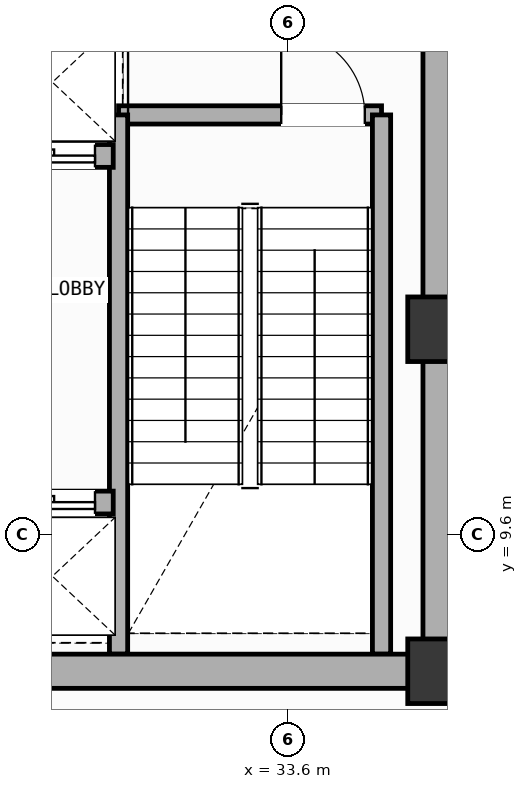
"""IFC4 building model, lengths in metres.
Left out: names, types, materials, properties, quantities, classifications, styles, units other than length and angle.
Written with IfcOpenShell. Run it as: python <this file> out.ifc"""

import sys

from ifc_helpers import new_model, si_unit, direction, frame, frame_2d, origin, origin_2d, place, context, subcontext, project, spatial, rectangle, extrude, element, fill, save


model = new_model("IFC4")
c1 = context("Model", 3, precision=1e-05, world=origin(), true_north=direction((0.0, 1.0)))
c2 = subcontext(c1, "Body", "Model", "MODEL_VIEW")
j1 = project(units=[si_unit("LENGTHUNIT", "METRE"), si_unit("PLANEANGLEUNIT", "RADIAN")], contexts=[c1])
p1 = place(None, origin())
s1 = spatial("IfcSite", under=j1, at=p1, CompositionType="ELEMENT")
p2 = place(p1, origin())
s2 = spatial("IfcBuilding", under=s1, at=p2, CompositionType="ELEMENT")
p3 = place(p2, frame((0.0, 0.0, 328.6)))
s3 = spatial("IfcBuildingStorey", under=s2, at=p3, CompositionType="ELEMENT", Elevation=328.6)
for number, where, z_axis, x_axis in (
    (1, (35.6, 7.8, 0.0), (0.0, 0.0, 1.0), (1.0, 0.0, 0.0)),
    (2, (35.6, 12.3, 0.0), (0.0, 0.0, 1.0), (1.0, 0.0, 0.0)),
):
    element("IfcColumn", number, at=place(p3, frame(where, z_axis=z_axis, x_axis=x_axis)), inside=s3, PredefinedType="COLUMN", context=c2, shape_type="SweptSolid", body=[
        extrude(rectangle(XDim=0.85, YDim=0.85, at=origin_2d()), origin(), (0.0, 0.0, 1.0), 4.8),
    ])
p4 = place(p3, frame((31.37, 15.12, 0.0), z_axis=(0.0, 0.0, 1.0), x_axis=(1.0, 0.0, 0.0)))
e3 = element("IfcWall", 3, at=p4, inside=s3, PredefinedType="SOLIDWALL", context=c2, shape_type="SweptSolid", body=[
    extrude(rectangle(XDim=3.46, YDim=0.24, at=frame_2d((1.73, 0.0))), origin(), (0.0, 0.0, 1.0), 4.58),
])
p5 = place(p4, frame((2.14, 0.0, 0.0)))
e4 = element("IfcOpeningElement", 4, at=p5, cuts=e3, PredefinedType="OPENING", context=c2, shape_type="SweptSolid", body=[
    extrude(rectangle(XDim=1.1, YDim=2.15, at=frame_2d((0.55, 1.075))), frame((0.0, 0.13, 0.0), z_axis=(0.0, -1.0, 0.0), x_axis=(1.0, 0.0, 0.0)), (0.0, 0.0, 1.0), 0.26),
])
for number, where, z_axis, x_axis in (
    (5, (34.83, 15.12, 0.0), (0.0, 0.0, 1.0), (0.0, -1.0, 0.0)),
    (6, (31.37, 8.025, 0.0), (0.0, 0.0, 1.0), (0.0, 1.0, 0.0)),
):
    element("IfcWall", number, at=place(p3, frame(where, z_axis=z_axis, x_axis=x_axis)), inside=s3, PredefinedType="SOLIDWALL", context=c2, shape_type="SweptSolid", body=[
        extrude(rectangle(XDim=7.095, YDim=0.24, at=frame_2d((3.548, 0.0))), origin(), (0.0, 0.0, 1.0), 4.58),
    ])
p6 = place(p3, frame((24.8, 7.8, 0.0), z_axis=(0.0, 0.0, 1.0), x_axis=(1.0, 0.0, 0.0)))
e7 = element("IfcWall", 7, at=p6, inside=s3, PredefinedType="SHEAR", context=c2, shape_type="SweptSolid", body=[
    extrude(rectangle(XDim=10.8, YDim=0.45, at=frame_2d((5.4, 0.0))), origin(), (0.0, 0.0, 1.0), 4.58),
])
p7 = place(p3, frame((35.6, 7.8, 0.0), z_axis=(0.0, 0.0, 1.0), x_axis=(0.0, 1.0, 0.0)))
e8 = element("IfcWall", 8, at=p7, inside=s3, PredefinedType="SHEAR", context=c2, shape_type="SweptSolid", body=[
    extrude(rectangle(XDim=9.0, YDim=0.45, at=frame_2d((4.5, 0.0))), origin(), (0.0, 0.0, 1.0), 4.58),
])
p8 = place(p3, frame((29.6, 10.02, 0.0), z_axis=(0.0, 0.0, 1.0), x_axis=(1.0, 0.0, 0.0)))
e9 = element("IfcWall", 9, at=p8, inside=s3, PredefinedType="SOLIDWALL", context=c2, shape_type="SweptSolid", body=[
    extrude(rectangle(XDim=1.7, YDim=0.3, at=frame_2d((0.85, 0.0))), origin(), (0.0, 0.0, 1.0), 4.58),
])
p9 = place(p8, frame((0.34, 0.0, 0.0)))
e10 = element("IfcOpeningElement", 10, at=p9, cuts=e9, PredefinedType="OPENING", context=c2, shape_type="SweptSolid", body=[
    extrude(rectangle(XDim=1.12, YDim=2.15, at=frame_2d((0.56, 1.075))), frame((0.0, 0.16, 0.0), z_axis=(0.0, -1.0, 0.0), x_axis=(1.0, 0.0, 0.0)), (0.0, 0.0, 1.0), 0.32),
])
p10 = place(p3, frame((29.6, 14.58, 0.0), z_axis=(0.0, 0.0, 1.0), x_axis=(1.0, 0.0, 0.0)))
e11 = element("IfcWall", 11, at=p10, inside=s3, PredefinedType="SOLIDWALL", context=c2, shape_type="SweptSolid", body=[
    extrude(rectangle(XDim=1.7, YDim=0.3, at=frame_2d((0.85, 0.0))), origin(), (0.0, 0.0, 1.0), 4.58),
])
p11 = place(p10, frame((0.34, 0.0, 0.0)))
e12 = element("IfcOpeningElement", 12, at=p11, cuts=e11, PredefinedType="OPENING", context=c2, shape_type="SweptSolid", body=[
    extrude(rectangle(XDim=1.12, YDim=2.15, at=frame_2d((0.56, 1.075))), frame((0.0, 0.16, 0.0), z_axis=(0.0, -1.0, 0.0), x_axis=(1.0, 0.0, 0.0)), (0.0, 0.0, 1.0), 0.32),
])
p12 = place(p3, frame((35.396, -4.55, 0.0), z_axis=(0.0, 0.0, 1.0), x_axis=(0.398695317753, 0.917083444187, 0.0)))
e13 = element("IfcWall", 13, at=p12, inside=s3, PredefinedType="PARTITIONING", context=c2, shape_type="SweptSolid", body=[
    extrude(rectangle(XDim=13.336, YDim=0.15, at=frame_2d((6.668, 0.0))), origin(), (0.0, 0.0, 1.0), 3.565),
])
p13 = place(p12, frame((6.068, 0.0, 0.0)))
e14 = element("IfcOpeningElement", 14, at=p13, cuts=e13, PredefinedType="OPENING", context=c2, shape_type="SweptSolid", body=[
    extrude(rectangle(XDim=1.2, YDim=2.15, at=frame_2d((0.6, 1.075))), frame((0.0, 0.085, 0.0), z_axis=(0.0, -1.0, 0.0), x_axis=(1.0, 0.0, 0.0)), (0.0, 0.0, 1.0), 0.17),
])
p14 = place(p3, frame((26.214, 7.675, 0.0), z_axis=(0.0, 0.0, 1.0), x_axis=(0.91704872202, -0.398775176561, 0.0)))
e15 = element("IfcWall", 15, at=p14, inside=s3, PredefinedType="PARTITIONING", context=c2, shape_type="SweptSolid", body=[
    extrude(rectangle(XDim=9.825, YDim=0.15, at=frame_2d((4.913, 0.0))), origin(), (0.0, 0.0, 1.0), 4.58),
])
p15 = place(p14, frame((7.74, 0.0, 0.0)))
e16 = element("IfcOpeningElement", 16, at=p15, cuts=e15, PredefinedType="OPENING", context=c2, shape_type="SweptSolid", body=[
    extrude(rectangle(XDim=1.2, YDim=2.15, at=frame_2d((0.6, 1.075))), frame((0.0, 0.085, 0.0), z_axis=(0.0, -1.0, 0.0), x_axis=(1.0, 0.0, 0.0)), (0.0, 0.0, 1.0), 0.17),
])
p16 = place(p3, frame((32.323, -3.214, 0.0), z_axis=(0.0, 0.0, 1.0), x_axis=(-0.917060632086, 0.398747786298, 0.0)))
e17 = element("IfcWall", 17, at=p16, inside=s3, PredefinedType="PARTITIONING", context=c2, shape_type="SweptSolid", body=[
    extrude(rectangle(XDim=26.771, YDim=0.15, at=frame_2d((13.386, 0.0))), origin(), (0.0, 0.0, 1.0), 4.58),
])
p17 = place(p5, origin())
e18 = element("IfcDoor", 18, at=p17, inside=s3, OperationType="SINGLE_SWING_LEFT", PredefinedType="DOOR", context=c2, shape_type="SweptSolid", body=[
    extrude(rectangle(XDim=1.1, YDim=2.15, at=frame_2d((0.55, 1.075))), frame((0.0, 0.025, 0.0), z_axis=(0.0, -1.0, 0.0), x_axis=(1.0, 0.0, 0.0)), (0.0, 0.0, 1.0), 0.05),
])
fill(e4, e18)
p18 = place(p9, origin())
e19 = element("IfcDoor", 19, at=p18, inside=s3, OperationType="DOUBLE_DOOR_SLIDING", PredefinedType="DOOR", context=c2, shape_type="SweptSolid", body=[
    extrude(rectangle(XDim=1.12, YDim=2.15, at=frame_2d((0.56, 1.075))), frame((0.0, 0.025, 0.0), z_axis=(0.0, -1.0, 0.0), x_axis=(1.0, 0.0, 0.0)), (0.0, 0.0, 1.0), 0.05),
])
fill(e10, e19)
p19 = place(p11, origin())
e20 = element("IfcDoor", 20, at=p19, inside=s3, OperationType="DOUBLE_DOOR_SLIDING", PredefinedType="DOOR", context=c2, shape_type="SweptSolid", body=[
    extrude(rectangle(XDim=1.12, YDim=2.15, at=frame_2d((0.56, 1.075))), frame((0.0, 0.025, 0.0), z_axis=(0.0, -1.0, 0.0), x_axis=(1.0, 0.0, 0.0)), (0.0, 0.0, 1.0), 0.05),
])
fill(e12, e20)
save(model, sys.argv[1])
